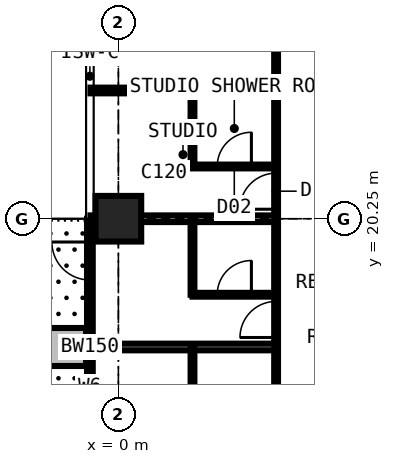
"""IFC4 building model, lengths in metres.
Left out: names, types, materials, properties, quantities, classifications, styles, units other than length and angle.
Written with IfcOpenShell. Run it as: python <this file> out.ifc"""

import sys

from ifc_helpers import new_model, si_unit, direction, frame, frame_2d, origin, origin_2d, place, context, subcontext, project, spatial, rectangle, extrude, element, fill, save


model = new_model("IFC4")
c1 = context("Model", 3, precision=1e-05, world=origin(), true_north=direction((0.0, 1.0)))
c2 = subcontext(c1, "Body", "Model", "MODEL_VIEW")
j1 = project(units=[si_unit("LENGTHUNIT", "METRE"), si_unit("PLANEANGLEUNIT", "RADIAN")], contexts=[c1])
p1 = place(None, origin())
s1 = spatial("IfcSite", under=j1, at=p1, CompositionType="ELEMENT")
p2 = place(p1, origin())
s2 = spatial("IfcBuilding", under=s1, at=p2, CompositionType="ELEMENT")
p3 = place(p2, frame((0.0, 0.0, 185.4)))
s3 = spatial("IfcBuildingStorey", under=s2, at=p3, CompositionType="ELEMENT", Elevation=185.4)
p4 = place(p3, frame((0.0, 20.25, 0.0), z_axis=(0.0, 0.0, 1.0), x_axis=(1.0, 0.0, 0.0)))
e1 = element("IfcColumn", 1, at=p4, inside=s3, PredefinedType="COLUMN", context=c2, shape_type="SweptSolid", body=[
    extrude(rectangle(XDim=1.2, YDim=1.2, at=origin_2d()), origin(), (0.0, 0.0, 1.0), 3.6),
])
p5 = place(p3, frame((-0.75, 13.5, 0.0), z_axis=(0.0, 0.0, 1.0), x_axis=(0.0, 1.0, 0.0)))
e2 = element("IfcWall", 2, at=p5, inside=s3, PredefinedType="SOLIDWALL", context=c2, shape_type="SweptSolid", body=[
    extrude(rectangle(XDim=6.75, YDim=0.15, at=frame_2d((3.375, 0.0))), origin(), (0.0, 0.0, 1.0), 3.375),
])
p6 = place(p5, frame((0.613, 0.0, 0.0)))
e3 = element("IfcOpeningElement", 3, at=p6, cuts=e2, PredefinedType="OPENING", context=c2, shape_type="SweptSolid", body=[
    extrude(rectangle(XDim=1.0, YDim=2.2, at=frame_2d((0.5, 1.1))), frame((0.0, 0.085, 0.0), z_axis=(0.0, -1.0, 0.0), x_axis=(1.0, 0.0, 0.0)), (0.0, 0.0, 1.0), 0.17),
])
p7 = place(p5, frame((1.725, 0.0, 0.9)))
e4 = element("IfcOpeningElement", 4, at=p7, cuts=e2, PredefinedType="OPENING", context=c2, shape_type="SweptSolid", body=[
    extrude(rectangle(XDim=1.2, YDim=1.8, at=frame_2d((0.6, 0.9))), frame((0.0, 0.085, 0.0), z_axis=(0.0, -1.0, 0.0), x_axis=(1.0, 0.0, 0.0)), (0.0, 0.0, 1.0), 0.17),
])
p8 = place(p5, frame((5.137, 0.0, 0.0)))
e5 = element("IfcOpeningElement", 5, at=p8, cuts=e2, PredefinedType="OPENING", context=c2, shape_type="SweptSolid", body=[
    extrude(rectangle(XDim=1.0, YDim=2.2, at=frame_2d((0.5, 1.1))), frame((0.0, 0.085, 0.0), z_axis=(0.0, -1.0, 0.0), x_axis=(1.0, 0.0, 0.0)), (0.0, 0.0, 1.0), 0.17),
])
p9 = place(p5, frame((3.825, 0.0, 0.9)))
e6 = element("IfcOpeningElement", 6, at=p9, cuts=e2, PredefinedType="OPENING", context=c2, shape_type="SweptSolid", body=[
    extrude(rectangle(XDim=1.2, YDim=1.8, at=frame_2d((0.6, 0.9))), frame((0.0, 0.085, 0.0), z_axis=(0.0, -1.0, 0.0), x_axis=(1.0, 0.0, 0.0)), (0.0, 0.0, 1.0), 0.17),
])
p10 = place(p3, frame((-0.85, 16.875, 0.0), z_axis=(0.0, 0.0, 1.0), x_axis=(-1.0, 0.0, 0.0)))
e7 = element("IfcWall", 7, at=p10, inside=s3, PredefinedType="USERDEFINED", context=c2, shape_type="SweptSolid", body=[
    extrude(rectangle(XDim=2.2, YDim=1.0, at=frame_2d((1.1, 0.0))), origin(), (0.0, 0.0, 1.0), 0.9),
])
p11 = place(p3, frame((-0.734, 16.875, 0.0), z_axis=(0.0, 0.0, 1.0), x_axis=(1.0, 0.0, 0.0)))
e8 = element("IfcWall", 8, at=p11, inside=s3, PredefinedType="PARTITIONING", context=c2, shape_type="SweptSolid", body=[
    extrude(rectangle(XDim=4.884, YDim=0.175, at=frame_2d((2.442, 0.0))), origin(), (0.0, 0.0, 1.0), 3.375),
])
p12 = place(p3, frame((-0.734, 20.25, 0.0), z_axis=(0.0, 0.0, 1.0), x_axis=(1.0, 0.0, 0.0)))
e9 = element("IfcWall", 9, at=p12, inside=s3, PredefinedType="PARTITIONING", context=c2, shape_type="SweptSolid", body=[
    extrude(rectangle(XDim=4.884, YDim=0.175, at=frame_2d((2.442, 0.0))), origin(), (0.0, 0.0, 1.0), 2.877),
])
p13 = place(p3, frame((-0.734, 23.625, 0.0), z_axis=(0.0, 0.0, 1.0), x_axis=(1.0, 0.0, 0.0)))
e10 = element("IfcWall", 10, at=p13, inside=s3, PredefinedType="PARTITIONING", context=c2, shape_type="SweptSolid", body=[
    extrude(rectangle(XDim=4.884, YDim=0.15, at=frame_2d((2.442, 0.0))), origin(), (0.0, 0.0, 1.0), 3.375),
])
for number, where, z_axis, x_axis in (
    (11, (1.95, 14.875, 0.0), (0.0, 0.0, 1.0), (0.0, 1.0, 0.0)),
    (12, (1.95, 18.25, 0.0), (0.0, 0.0, 1.0), (0.0, 1.0, 0.0)),
):
    element("IfcWall", number, at=place(p3, frame(where, z_axis=z_axis, x_axis=x_axis)), inside=s3, PredefinedType="PARTITIONING", context=c2, shape_type="SweptSolid", body=[
        extrude(rectangle(XDim=2.0, YDim=0.1, at=frame_2d((1.0, 0.0))), origin(), (0.0, 0.0, 1.0), 3.375),
    ])
p14 = place(p3, frame((1.95, 18.25, 0.0), z_axis=(0.0, 0.0, 1.0), x_axis=(1.0, 0.0, 0.0)))
e13 = element("IfcWall", 13, at=p14, inside=s3, PredefinedType="PARTITIONING", context=c2, shape_type="SweptSolid", body=[
    extrude(rectangle(XDim=2.2, YDim=0.1, at=frame_2d((1.1, 0.0))), origin(), (0.0, 0.0, 1.0), 3.375),
])
p15 = place(p14, frame((0.65, 0.0, 0.0)))
e14 = element("IfcOpeningElement", 14, at=p15, cuts=e13, PredefinedType="OPENING", context=c2, shape_type="SweptSolid", body=[
    extrude(rectangle(XDim=0.9, YDim=2.2, at=frame_2d((0.45, 1.1))), frame((0.0, 0.06, 0.0), z_axis=(0.0, -1.0, 0.0), x_axis=(1.0, 0.0, 0.0)), (0.0, 0.0, 1.0), 0.12),
])
p16 = place(p3, frame((1.95, 21.625, 0.0), z_axis=(0.0, 0.0, 1.0), x_axis=(0.0, 1.0, 0.0)))
e15 = element("IfcWall", 15, at=p16, inside=s3, PredefinedType="PARTITIONING", context=c2, shape_type="SweptSolid", body=[
    extrude(rectangle(XDim=2.0, YDim=0.1, at=frame_2d((1.0, 0.0))), origin(), (0.0, 0.0, 1.0), 3.375),
])
p17 = place(p3, frame((1.95, 21.625, 0.0), z_axis=(0.0, 0.0, 1.0), x_axis=(1.0, 0.0, 0.0)))
e16 = element("IfcWall", 16, at=p17, inside=s3, PredefinedType="PARTITIONING", context=c2, shape_type="SweptSolid", body=[
    extrude(rectangle(XDim=2.2, YDim=0.1, at=frame_2d((1.1, 0.0))), origin(), (0.0, 0.0, 1.0), 3.375),
])
p18 = place(p17, frame((0.65, 0.0, 0.0)))
e17 = element("IfcOpeningElement", 17, at=p18, cuts=e16, PredefinedType="OPENING", context=c2, shape_type="SweptSolid", body=[
    extrude(rectangle(XDim=0.9, YDim=2.2, at=frame_2d((0.45, 1.1))), frame((0.0, 0.06, 0.0), z_axis=(0.0, -1.0, 0.0), x_axis=(1.0, 0.0, 0.0)), (0.0, 0.0, 1.0), 0.12),
])
p19 = place(p3, frame((4.15, 10.125, 0.0), z_axis=(0.0, 0.0, 1.0), x_axis=(0.0, 1.0, 0.0)))
e18 = element("IfcWall", 18, at=p19, inside=s3, PredefinedType="PARTITIONING", context=c2, shape_type="SweptSolid", body=[
    extrude(rectangle(XDim=16.875, YDim=0.1, at=frame_2d((8.438, 0.0))), origin(), (0.0, 0.0, 1.0), 3.375),
])
p20 = place(p19, frame((0.2, 0.0, 0.0)))
e19 = element("IfcOpeningElement", 19, at=p20, cuts=e18, PredefinedType="OPENING", context=c2, shape_type="SweptSolid", body=[
    extrude(rectangle(XDim=0.95, YDim=2.2, at=frame_2d((0.475, 1.1))), frame((0.0, 0.06, 0.0), z_axis=(0.0, -1.0, 0.0), x_axis=(1.0, 0.0, 0.0)), (0.0, 0.0, 1.0), 0.12),
])
p21 = place(p19, frame((3.625, 0.0, 0.0)))
e20 = element("IfcOpeningElement", 20, at=p21, cuts=e18, PredefinedType="OPENING", context=c2, shape_type="SweptSolid", body=[
    extrude(rectangle(XDim=0.95, YDim=2.2, at=frame_2d((0.475, 1.1))), frame((0.0, 0.06, 0.0), z_axis=(0.0, -1.0, 0.0), x_axis=(1.0, 0.0, 0.0)), (0.0, 0.0, 1.0), 0.12),
])
p22 = place(p19, frame((7.0, 0.0, 0.0)))
e21 = element("IfcOpeningElement", 21, at=p22, cuts=e18, PredefinedType="OPENING", context=c2, shape_type="SweptSolid", body=[
    extrude(rectangle(XDim=0.95, YDim=2.2, at=frame_2d((0.475, 1.1))), frame((0.0, 0.06, 0.0), z_axis=(0.0, -1.0, 0.0), x_axis=(1.0, 0.0, 0.0)), (0.0, 0.0, 1.0), 0.12),
])
p23 = place(p19, frame((10.375, 0.0, 0.0)))
e22 = element("IfcOpeningElement", 22, at=p23, cuts=e18, PredefinedType="OPENING", context=c2, shape_type="SweptSolid", body=[
    extrude(rectangle(XDim=0.95, YDim=2.2, at=frame_2d((0.475, 1.1))), frame((0.0, 0.06, 0.0), z_axis=(0.0, -1.0, 0.0), x_axis=(1.0, 0.0, 0.0)), (0.0, 0.0, 1.0), 0.12),
])
p24 = place(p7, origin())
e23 = element("IfcWindow", 23, at=p24, inside=s3, PartitioningType="SINGLE_PANEL", PredefinedType="WINDOW", context=c2, shape_type="SweptSolid", body=[
    extrude(rectangle(XDim=1.2, YDim=1.8, at=frame_2d((0.6, 0.9))), frame((0.0, 0.03, 0.0), z_axis=(0.0, -1.0, 0.0), x_axis=(1.0, 0.0, 0.0)), (0.0, 0.0, 1.0), 0.06),
])
fill(e4, e23)
p25 = place(p8, origin())
e24 = element("IfcDoor", 24, at=p25, inside=s3, OperationType="SINGLE_SWING_RIGHT", PredefinedType="DOOR", context=c2, shape_type="SweptSolid", body=[
    extrude(rectangle(XDim=1.0, YDim=2.2, at=frame_2d((0.5, 1.1))), frame((0.0, 0.025, 0.0), z_axis=(0.0, -1.0, 0.0), x_axis=(1.0, 0.0, 0.0)), (0.0, 0.0, 1.0), 0.05),
])
fill(e5, e24)
p26 = place(p9, origin())
e25 = element("IfcWindow", 25, at=p26, inside=s3, PartitioningType="SINGLE_PANEL", PredefinedType="WINDOW", context=c2, shape_type="SweptSolid", body=[
    extrude(rectangle(XDim=1.2, YDim=1.8, at=frame_2d((0.6, 0.9))), frame((0.0, 0.03, 0.0), z_axis=(0.0, -1.0, 0.0), x_axis=(1.0, 0.0, 0.0)), (0.0, 0.0, 1.0), 0.06),
])
fill(e6, e25)
p27 = place(p22, origin())
e26 = element("IfcDoor", 26, at=p27, inside=s3, OperationType="SINGLE_SWING_LEFT", PredefinedType="DOOR", context=c2, shape_type="SweptSolid", body=[
    extrude(rectangle(XDim=0.95, YDim=2.2, at=frame_2d((0.475, 1.1))), frame((0.0, 0.025, 0.0), z_axis=(0.0, -1.0, 0.0), x_axis=(1.0, 0.0, 0.0)), (0.0, 0.0, 1.0), 0.05),
])
fill(e21, e26)
p28 = place(p15, origin())
e27 = element("IfcDoor", 27, at=p28, inside=s3, OperationType="SINGLE_SWING_RIGHT", PredefinedType="DOOR", context=c2, shape_type="SweptSolid", body=[
    extrude(rectangle(XDim=0.9, YDim=2.2, at=frame_2d((0.45, 1.1))), frame((0.0, 0.025, 0.0), z_axis=(0.0, -1.0, 0.0), x_axis=(1.0, 0.0, 0.0)), (0.0, 0.0, 1.0), 0.05),
])
fill(e14, e27)
p29 = place(p23, origin())
e28 = element("IfcDoor", 28, at=p29, inside=s3, OperationType="SINGLE_SWING_LEFT", PredefinedType="DOOR", context=c2, shape_type="SweptSolid", body=[
    extrude(rectangle(XDim=0.95, YDim=2.2, at=frame_2d((0.475, 1.1))), frame((0.0, 0.025, 0.0), z_axis=(0.0, -1.0, 0.0), x_axis=(1.0, 0.0, 0.0)), (0.0, 0.0, 1.0), 0.05),
])
fill(e22, e28)
p30 = place(p18, origin())
e29 = element("IfcDoor", 29, at=p30, inside=s3, OperationType="SINGLE_SWING_RIGHT", PredefinedType="DOOR", context=c2, shape_type="SweptSolid", body=[
    extrude(rectangle(XDim=0.9, YDim=2.2, at=frame_2d((0.45, 1.1))), frame((0.0, 0.025, 0.0), z_axis=(0.0, -1.0, 0.0), x_axis=(1.0, 0.0, 0.0)), (0.0, 0.0, 1.0), 0.05),
])
fill(e17, e29)
save(model, sys.argv[1])
